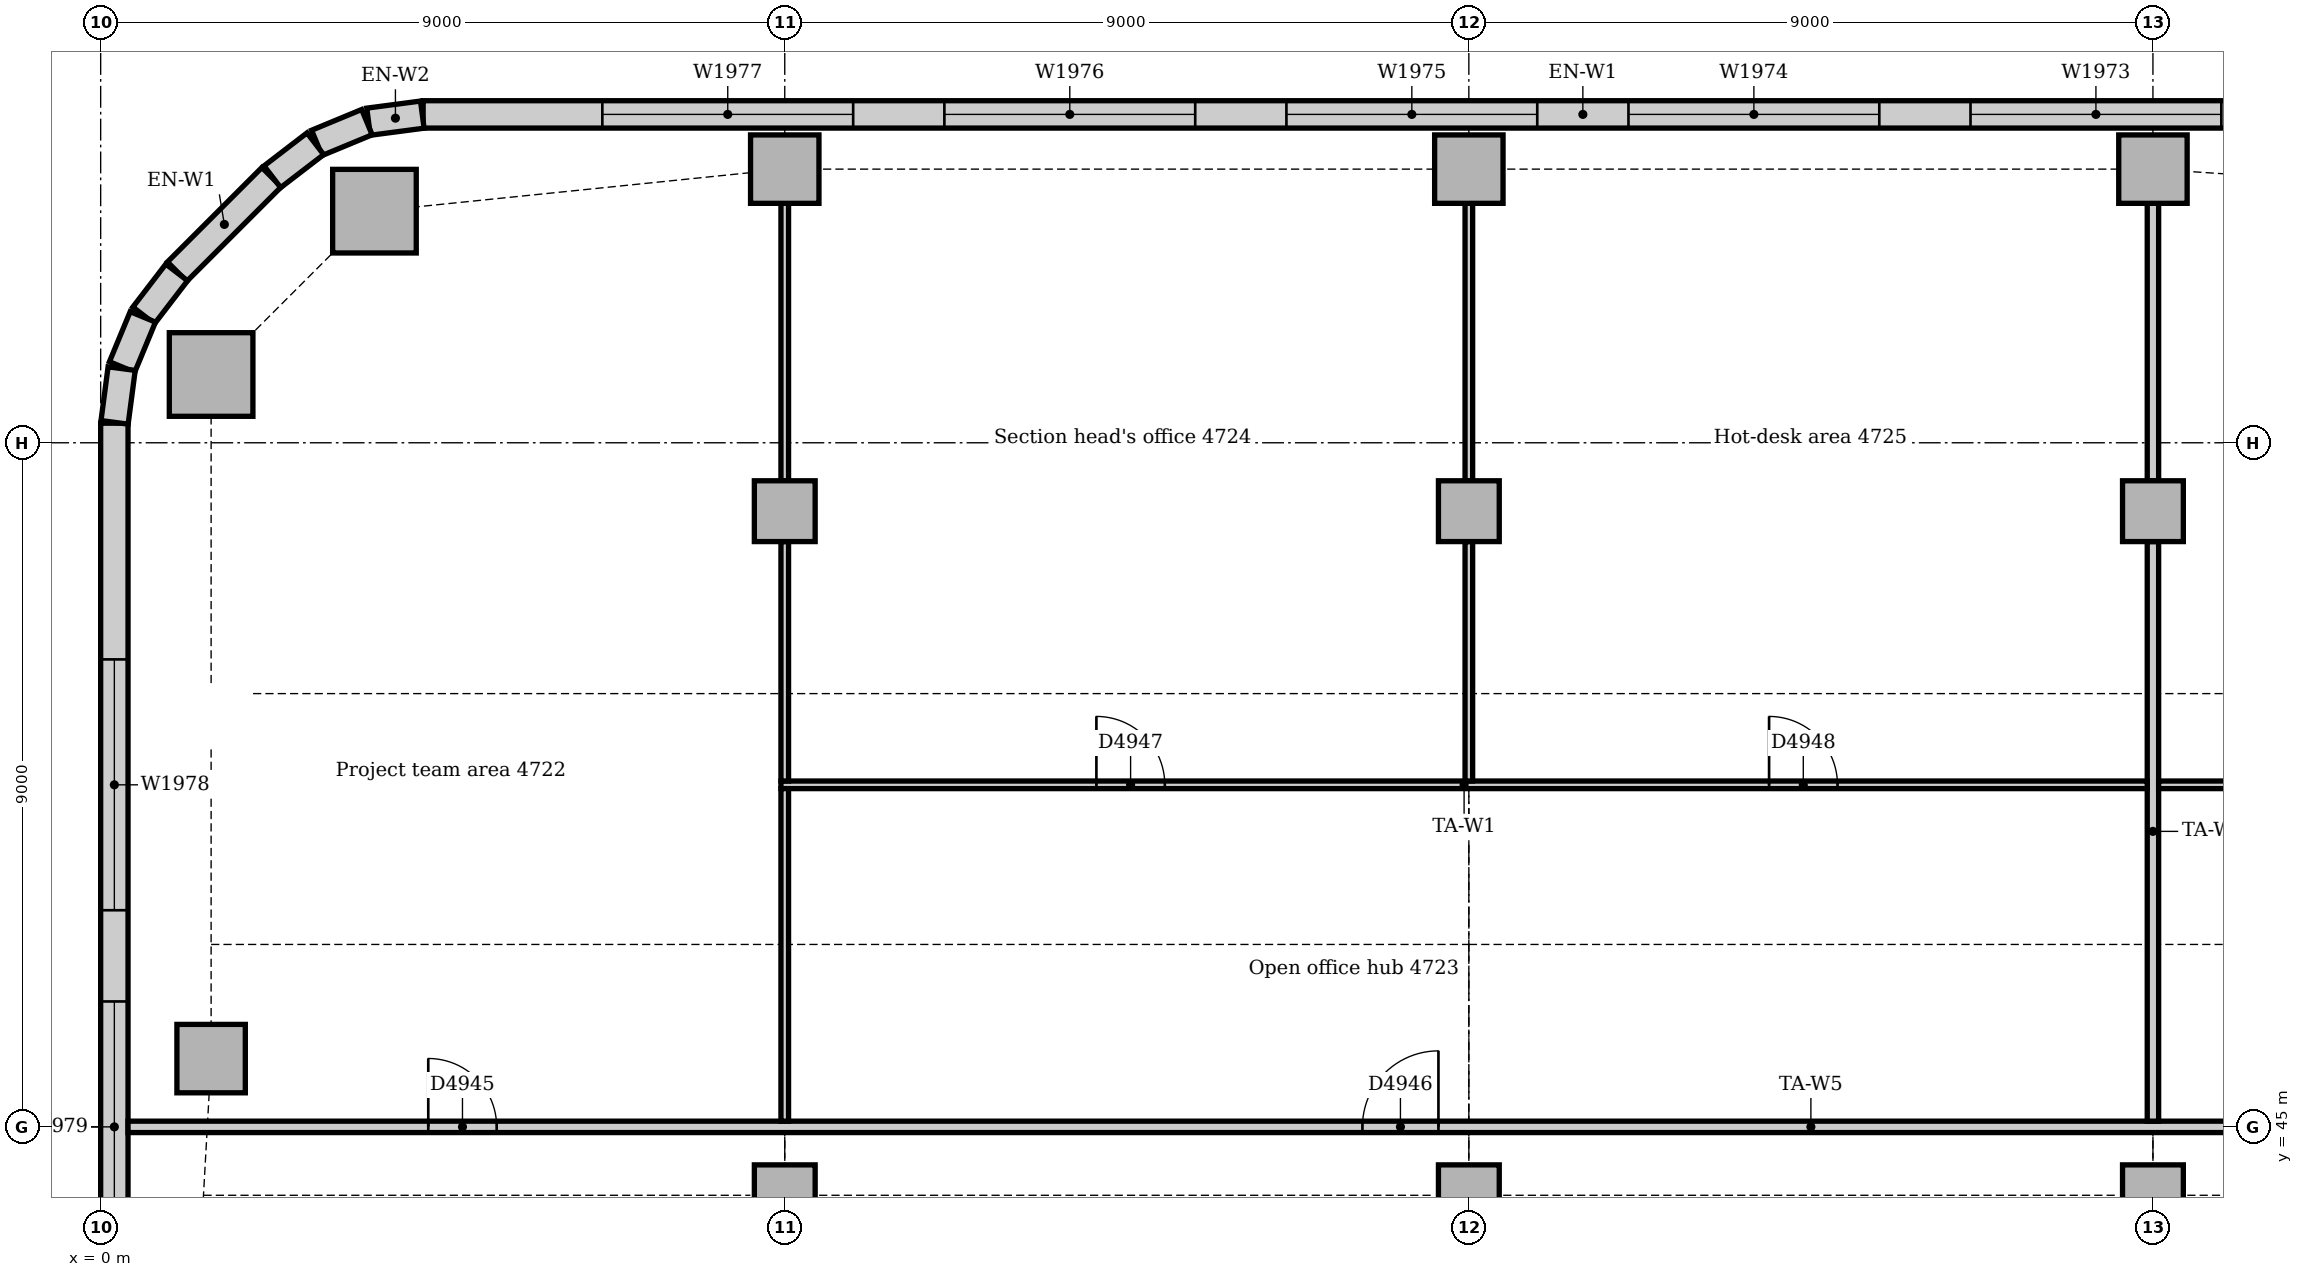
"""IFC4 building model, lengths in metres.
Left out: names, types, materials, properties, quantities, classifications, styles, units other than length and angle.
Written with IfcOpenShell. Run it as: python <this file> out.ifc"""

import sys

from ifc_helpers import new_model, si_unit, direction, frame, frame_2d, origin, origin_2d, place, context, subcontext, project, spatial, rectangle, extrude, element, fill, save


model = new_model("IFC4")
c1 = context("Model", 3, precision=1e-05, world=origin(), true_north=direction((0.0, 1.0)))
c2 = subcontext(c1, "Body", "Model", "MODEL_VIEW")
j1 = project(units=[si_unit("LENGTHUNIT", "METRE"), si_unit("PLANEANGLEUNIT", "RADIAN")], contexts=[c1])
p1 = place(None, origin())
s1 = spatial("IfcSite", under=j1, at=p1, CompositionType="ELEMENT")
p2 = place(p1, origin())
s2 = spatial("IfcBuilding", under=s1, at=p2, CompositionType="ELEMENT")
p3 = place(p2, frame((0.0, 0.0, 198.0)))
s3 = spatial("IfcBuildingStorey", under=s2, at=p3, CompositionType="ELEMENT", Elevation=198.0)
for number, where, z_axis, x_axis in (
    (1, (3.602, 57.047, -0.15), (0.0, 0.0, 1.0), (1.0, 0.0, 0.0)),
    (2, (1.453, 54.898, -0.15), (0.0, 0.0, 1.0), (1.0, 0.0, 0.0)),
):
    element("IfcColumn", number, at=place(p3, frame(where, z_axis=z_axis, x_axis=x_axis)), inside=s3, PredefinedType="COLUMN", context=c2, shape_type="SweptSolid", body=[
        extrude(rectangle(XDim=1.1, YDim=1.1, at=origin_2d()), origin(), (0.0, 0.0, 1.0), 4.0),
    ])
for number, where, z_axis, x_axis in (
    (3, (9.0, 57.6, -0.15), (0.0, 0.0, 1.0), (1.0, 0.0, 0.0)),
    (4, (18.0, 57.6, -0.15), (0.0, 0.0, 1.0), (1.0, 0.0, 0.0)),
    (5, (27.0, 57.6, -0.15), (0.0, 0.0, 1.0), (1.0, 0.0, 0.0)),
):
    element("IfcColumn", number, at=place(p3, frame(where, z_axis=z_axis, x_axis=x_axis)), inside=s3, PredefinedType="COLUMN", context=c2, shape_type="SweptSolid", body=[
        extrude(rectangle(XDim=0.9, YDim=0.9, at=origin_2d()), origin(), (0.0, 0.0, 1.0), 4.0),
    ])
p4 = place(p3, frame((1.453, 45.898, 0.0), z_axis=(0.0, 0.0, 1.0), x_axis=(1.0, 0.0, 0.0)))
e6 = element("IfcColumn", 6, at=p4, inside=s3, PredefinedType="COLUMN", context=c2, shape_type="SweptSolid", body=[
    extrude(rectangle(XDim=0.9, YDim=0.9, at=origin_2d()), origin(), (0.0, 0.0, 1.0), 3.85),
])
for number, where, z_axis, x_axis in (
    (7, (9.0, 44.1, 0.0), (0.0, 0.0, 1.0), (1.0, 0.0, 0.0)),
    (8, (9.0, 53.1, 0.0), (0.0, 0.0, 1.0), (1.0, 0.0, 0.0)),
    (9, (18.0, 44.1, 0.0), (0.0, 0.0, 1.0), (1.0, 0.0, 0.0)),
    (10, (18.0, 53.1, 0.0), (0.0, 0.0, 1.0), (1.0, 0.0, 0.0)),
    (11, (27.0, 44.1, 0.0), (0.0, 0.0, 1.0), (1.0, 0.0, 0.0)),
    (12, (27.0, 53.1, 0.0), (0.0, 0.0, 1.0), (1.0, 0.0, 0.0)),
):
    element("IfcColumn", number, at=place(p3, frame(where, z_axis=z_axis, x_axis=x_axis)), inside=s3, PredefinedType="COLUMN", context=c2, shape_type="SweptSolid", body=[
        extrude(rectangle(XDim=0.8, YDim=0.8, at=origin_2d()), origin(), (0.0, 0.0, 1.0), 3.85),
    ])
p5 = place(p3, frame((34.757, 58.32, 0.0), z_axis=(0.0, 0.0, 1.0), x_axis=(-1.0, 0.0, 0.0)))
e13 = element("IfcWall", 13, at=p5, inside=s3, PredefinedType="STANDARD", context=c2, shape_type="SweptSolid", body=[
    extrude(rectangle(XDim=30.515, YDim=0.36, at=frame_2d((15.257, 0.0))), origin(), (0.0, 0.0, 1.0), 3.85),
])
p6 = place(p5, frame((2.357, 0.0, 0.9)))
e14 = element("IfcOpeningElement", 14, at=p6, cuts=e13, PredefinedType="OPENING", context=c2, shape_type="SweptSolid", body=[
    extrude(rectangle(XDim=3.3, YDim=1.6, at=frame_2d((1.65, 0.8))), frame((0.0, 0.19, 0.0), z_axis=(0.0, -1.0, 0.0), x_axis=(1.0, 0.0, 0.0)), (0.0, 0.0, 1.0), 0.38),
])
p7 = place(p5, frame((6.857, 0.0, 0.9)))
e15 = element("IfcOpeningElement", 15, at=p7, cuts=e13, PredefinedType="OPENING", context=c2, shape_type="SweptSolid", body=[
    extrude(rectangle(XDim=3.3, YDim=1.6, at=frame_2d((1.65, 0.8))), frame((0.0, 0.19, 0.0), z_axis=(0.0, -1.0, 0.0), x_axis=(1.0, 0.0, 0.0)), (0.0, 0.0, 1.0), 0.38),
])
p8 = place(p5, frame((11.357, 0.0, 0.9)))
e16 = element("IfcOpeningElement", 16, at=p8, cuts=e13, PredefinedType="OPENING", context=c2, shape_type="SweptSolid", body=[
    extrude(rectangle(XDim=3.3, YDim=1.6, at=frame_2d((1.65, 0.8))), frame((0.0, 0.19, 0.0), z_axis=(0.0, -1.0, 0.0), x_axis=(1.0, 0.0, 0.0)), (0.0, 0.0, 1.0), 0.38),
])
p9 = place(p5, frame((15.857, 0.0, 0.9)))
e17 = element("IfcOpeningElement", 17, at=p9, cuts=e13, PredefinedType="OPENING", context=c2, shape_type="SweptSolid", body=[
    extrude(rectangle(XDim=3.3, YDim=1.6, at=frame_2d((1.65, 0.8))), frame((0.0, 0.19, 0.0), z_axis=(0.0, -1.0, 0.0), x_axis=(1.0, 0.0, 0.0)), (0.0, 0.0, 1.0), 0.38),
])
p10 = place(p5, frame((20.357, 0.0, 0.9)))
e18 = element("IfcOpeningElement", 18, at=p10, cuts=e13, PredefinedType="OPENING", context=c2, shape_type="SweptSolid", body=[
    extrude(rectangle(XDim=3.3, YDim=1.6, at=frame_2d((1.65, 0.8))), frame((0.0, 0.19, 0.0), z_axis=(0.0, -1.0, 0.0), x_axis=(1.0, 0.0, 0.0)), (0.0, 0.0, 1.0), 0.38),
])
p11 = place(p5, frame((24.857, 0.0, 0.9)))
e19 = element("IfcOpeningElement", 19, at=p11, cuts=e13, PredefinedType="OPENING", context=c2, shape_type="SweptSolid", body=[
    extrude(rectangle(XDim=3.3, YDim=1.6, at=frame_2d((1.65, 0.8))), frame((0.0, 0.19, 0.0), z_axis=(0.0, -1.0, 0.0), x_axis=(1.0, 0.0, 0.0)), (0.0, 0.0, 1.0), 0.38),
])
p12 = place(p3, frame((2.249, 57.494, 0.0), z_axis=(0.0, 0.0, 1.0), x_axis=(-0.707106781187, -0.707106781187, 0.0)))
e20 = element("IfcWall", 20, at=p12, inside=s3, PredefinedType="STANDARD", context=c2, shape_type="SweptSolid", body=[
    extrude(rectangle(XDim=1.757, YDim=0.36, at=frame_2d((0.879, 0.0))), origin(), (0.0, 0.0, 1.0), 3.85),
])
p13 = place(p3, frame((0.18, 54.257, 0.0), z_axis=(0.0, 0.0, 1.0), x_axis=(0.0, -1.0, 0.0)))
e21 = element("IfcWall", 21, at=p13, inside=s3, PredefinedType="STANDARD", context=c2, shape_type="SweptSolid", body=[
    extrude(rectangle(XDim=12.257, YDim=0.36, at=frame_2d((6.129, 0.0))), origin(), (0.0, 0.0, 1.0), 3.85),
])
p14 = place(p13, frame((3.107, 0.0, 0.9)))
e22 = element("IfcOpeningElement", 22, at=p14, cuts=e21, PredefinedType="OPENING", context=c2, shape_type="SweptSolid", body=[
    extrude(rectangle(XDim=3.3, YDim=1.6, at=frame_2d((1.65, 0.8))), frame((0.0, 0.19, 0.0), z_axis=(0.0, -1.0, 0.0), x_axis=(1.0, 0.0, 0.0)), (0.0, 0.0, 1.0), 0.38),
])
p15 = place(p13, frame((7.607, 0.0, 0.9)))
e23 = element("IfcOpeningElement", 23, at=p15, cuts=e21, PredefinedType="OPENING", context=c2, shape_type="SweptSolid", body=[
    extrude(rectangle(XDim=3.3, YDim=1.6, at=frame_2d((1.65, 0.8))), frame((0.0, 0.19, 0.0), z_axis=(0.0, -1.0, 0.0), x_axis=(1.0, 0.0, 0.0)), (0.0, 0.0, 1.0), 0.38),
])
for number, where, z_axis, x_axis in (
    (24, (4.231, 58.317, 0.0), (0.0, 0.0, 1.0), (-0.991, -0.131, 0.0)),
    (25, (3.503, 58.218, 0.0), (0.0, 0.0, 1.0), (-0.924, -0.383, 0.0)),
):
    element("IfcWall", number, at=place(p3, frame(where, z_axis=z_axis, x_axis=x_axis)), inside=s3, PredefinedType="STANDARD", context=c2, shape_type="SweptSolid", body=[
        extrude(rectangle(XDim=0.713, YDim=0.36, at=frame_2d((0.356, 0.0))), origin(), (0.0, 0.0, 1.0), 3.85),
    ])
for number, where, z_axis, x_axis in (
    (26, (2.825, 57.934, 0.0), (0.0, 0.0, 1.0), (-0.793, -0.609, 0.0)),
    (27, (1.0, 56.241, 0.0), (0.0, 0.0, 1.0), (-0.609, -0.793, 0.0)),
):
    element("IfcWall", number, at=place(p3, frame(where, z_axis=z_axis, x_axis=x_axis)), inside=s3, PredefinedType="STANDARD", context=c2, shape_type="SweptSolid", body=[
        extrude(rectangle(XDim=0.713, YDim=0.36, at=frame_2d((0.357, 0.0))), origin(), (0.0, 0.0, 1.0), 3.85),
    ])
for number, where, z_axis, x_axis in (
    (28, (0.555, 55.656, 0.0), (0.0, 0.0, 1.0), (-0.383, -0.924, 0.0)),
    (29, (0.276, 54.976, 0.0), (0.0, 0.0, 1.0), (-0.131, -0.991, 0.0)),
):
    element("IfcWall", number, at=place(p3, frame(where, z_axis=z_axis, x_axis=x_axis)), inside=s3, PredefinedType="STANDARD", context=c2, shape_type="SweptSolid", body=[
        extrude(rectangle(XDim=0.713, YDim=0.36, at=frame_2d((0.356, 0.0))), origin(), (0.0, 0.0, 1.0), 3.85),
    ])
p16 = place(p3, frame((0.36, 45.0, 0.0), z_axis=(0.0, 0.0, 1.0), x_axis=(1.0, 0.0, 0.0)))
e30 = element("IfcWall", 30, at=p16, inside=s3, PredefinedType="PARTITIONING", context=c2, shape_type="SweptSolid", body=[
    extrude(rectangle(XDim=44.28, YDim=0.15, at=frame_2d((22.14, 0.0))), origin(), (0.0, 0.0, 1.0), 3.85),
])
p17 = place(p16, frame((3.95, 0.0, 0.0)))
e31 = element("IfcOpeningElement", 31, at=p17, cuts=e30, PredefinedType="OPENING", context=c2, shape_type="SweptSolid", body=[
    extrude(rectangle(XDim=0.9, YDim=2.1, at=frame_2d((0.45, 1.05))), frame((0.0, 0.085, 0.0), z_axis=(0.0, -1.0, 0.0), x_axis=(1.0, 0.0, 0.0)), (0.0, 0.0, 1.0), 0.17),
])
p18 = place(p16, frame((16.24, 0.0, 0.0)))
e32 = element("IfcOpeningElement", 32, at=p18, cuts=e30, PredefinedType="OPENING", context=c2, shape_type="SweptSolid", body=[
    extrude(rectangle(XDim=1.0, YDim=2.1, at=frame_2d((0.5, 1.05))), frame((0.0, 0.085, 0.0), z_axis=(0.0, -1.0, 0.0), x_axis=(1.0, 0.0, 0.0)), (0.0, 0.0, 1.0), 0.17),
])
p19 = place(p16, frame((34.24, 0.0, 0.0)))
e33 = element("IfcOpeningElement", 33, at=p19, cuts=e30, PredefinedType="OPENING", context=c2, shape_type="SweptSolid", body=[
    extrude(rectangle(XDim=1.0, YDim=2.1, at=frame_2d((0.5, 1.05))), frame((0.0, 0.085, 0.0), z_axis=(0.0, -1.0, 0.0), x_axis=(1.0, 0.0, 0.0)), (0.0, 0.0, 1.0), 0.17),
])
p20 = place(p3, frame((27.0, 45.075, 0.0), z_axis=(0.0, 0.0, 1.0), x_axis=(0.0, 1.0, 0.0)))
e34 = element("IfcWall", 34, at=p20, inside=s3, PredefinedType="PARTITIONING", context=c2, shape_type="SweptSolid", body=[
    extrude(rectangle(XDim=7.625, YDim=0.15, at=frame_2d((3.812, 0.0))), origin(), (0.0, 0.0, 1.0), 3.35),
])
p21 = place(p3, frame((27.0, 53.5, 0.0), z_axis=(0.0, 0.0, 1.0), x_axis=(0.0, 1.0, 0.0)))
e35 = element("IfcWall", 35, at=p21, inside=s3, PredefinedType="PARTITIONING", context=c2, shape_type="SweptSolid", body=[
    extrude(rectangle(XDim=3.65, YDim=0.15, at=frame_2d((1.825, 0.0))), origin(), (0.0, 0.0, 1.0), 3.41),
])
p22 = place(p3, frame((8.95, 49.5, 0.0), z_axis=(0.0, 0.0, 1.0), x_axis=(1.0, 0.0, 0.0)))
e36 = element("IfcWall", 36, at=p22, inside=s3, PredefinedType="PARTITIONING", context=c2, shape_type="SweptSolid", body=[
    extrude(rectangle(XDim=17.975, YDim=0.1, at=frame_2d((8.988, 0.0))), origin(), (0.0, 0.0, 1.0), 3.85),
])
p23 = place(p22, frame((4.15, 0.0, 0.0)))
e37 = element("IfcOpeningElement", 37, at=p23, cuts=e36, PredefinedType="OPENING", context=c2, shape_type="SweptSolid", body=[
    extrude(rectangle(XDim=0.9, YDim=2.1, at=frame_2d((0.45, 1.05))), frame((0.0, 0.06, 0.0), z_axis=(0.0, -1.0, 0.0), x_axis=(1.0, 0.0, 0.0)), (0.0, 0.0, 1.0), 0.12),
])
p24 = place(p22, frame((13.0, 0.0, 0.0)))
e38 = element("IfcOpeningElement", 38, at=p24, cuts=e36, PredefinedType="OPENING", context=c2, shape_type="SweptSolid", body=[
    extrude(rectangle(XDim=0.9, YDim=2.1, at=frame_2d((0.45, 1.05))), frame((0.0, 0.06, 0.0), z_axis=(0.0, -1.0, 0.0), x_axis=(1.0, 0.0, 0.0)), (0.0, 0.0, 1.0), 0.12),
])
p25 = place(p3, frame((27.075, 49.5, 0.0), z_axis=(0.0, 0.0, 1.0), x_axis=(1.0, 0.0, 0.0)))
e39 = element("IfcWall", 39, at=p25, inside=s3, PredefinedType="PARTITIONING", context=c2, shape_type="SweptSolid", body=[
    extrude(rectangle(XDim=17.24, YDim=0.1, at=frame_2d((8.62, 0.0))), origin(), (0.0, 0.0, 1.0), 3.85),
])
p26 = place(p25, frame((4.1, 0.0, 0.0)))
e40 = element("IfcOpeningElement", 40, at=p26, cuts=e39, PredefinedType="OPENING", context=c2, shape_type="SweptSolid", body=[
    extrude(rectangle(XDim=0.9, YDim=2.1, at=frame_2d((0.45, 1.05))), frame((0.0, 0.06, 0.0), z_axis=(0.0, -1.0, 0.0), x_axis=(1.0, 0.0, 0.0)), (0.0, 0.0, 1.0), 0.12),
])
p27 = place(p25, frame((12.575, 0.0, 0.0)))
e41 = element("IfcOpeningElement", 41, at=p27, cuts=e39, PredefinedType="OPENING", context=c2, shape_type="SweptSolid", body=[
    extrude(rectangle(XDim=0.9, YDim=2.1, at=frame_2d((0.45, 1.05))), frame((0.0, 0.06, 0.0), z_axis=(0.0, -1.0, 0.0), x_axis=(1.0, 0.0, 0.0)), (0.0, 0.0, 1.0), 0.12),
])
p28 = place(p3, frame((9.0, 45.075, 0.0), z_axis=(0.0, 0.0, 1.0), x_axis=(0.0, 1.0, 0.0)))
e42 = element("IfcWall", 42, at=p28, inside=s3, PredefinedType="PARTITIONING", context=c2, shape_type="SweptSolid", body=[
    extrude(rectangle(XDim=4.375, YDim=0.1, at=frame_2d((2.188, 0.0))), origin(), (0.0, 0.0, 1.0), 3.35),
])
p29 = place(p3, frame((9.0, 49.55, 0.0), z_axis=(0.0, 0.0, 1.0), x_axis=(0.0, 1.0, 0.0)))
e43 = element("IfcWall", 43, at=p29, inside=s3, PredefinedType="PARTITIONING", context=c2, shape_type="SweptSolid", body=[
    extrude(rectangle(XDim=3.15, YDim=0.1, at=frame_2d((1.575, 0.0))), origin(), (0.0, 0.0, 1.0), 3.35),
])
p30 = place(p3, frame((9.0, 53.5, 0.0), z_axis=(0.0, 0.0, 1.0), x_axis=(0.0, 1.0, 0.0)))
e44 = element("IfcWall", 44, at=p30, inside=s3, PredefinedType="PARTITIONING", context=c2, shape_type="SweptSolid", body=[
    extrude(rectangle(XDim=3.65, YDim=0.1, at=frame_2d((1.825, 0.0))), origin(), (0.0, 0.0, 1.0), 3.41),
])
p31 = place(p3, frame((18.0, 49.55, 0.0), z_axis=(0.0, 0.0, 1.0), x_axis=(0.0, 1.0, 0.0)))
e45 = element("IfcWall", 45, at=p31, inside=s3, PredefinedType="PARTITIONING", context=c2, shape_type="SweptSolid", body=[
    extrude(rectangle(XDim=3.15, YDim=0.1, at=frame_2d((1.575, 0.0))), origin(), (0.0, 0.0, 1.0), 3.35),
])
p32 = place(p3, frame((18.0, 53.5, 0.0), z_axis=(0.0, 0.0, 1.0), x_axis=(0.0, 1.0, 0.0)))
e46 = element("IfcWall", 46, at=p32, inside=s3, PredefinedType="PARTITIONING", context=c2, shape_type="SweptSolid", body=[
    extrude(rectangle(XDim=3.65, YDim=0.1, at=frame_2d((1.825, 0.0))), origin(), (0.0, 0.0, 1.0), 3.41),
])
p33 = place(p7, origin())
e47 = element("IfcWindow", 47, at=p33, inside=s3, PartitioningType="SINGLE_PANEL", PredefinedType="WINDOW", context=c2, shape_type="SweptSolid", body=[
    extrude(rectangle(XDim=3.3, YDim=1.6, at=frame_2d((1.65, 0.8))), frame((0.0, 0.13, 0.0), z_axis=(0.0, -1.0, 0.0), x_axis=(1.0, 0.0, 0.0)), (0.0, 0.0, 1.0), 0.06),
])
fill(e15, e47)
p34 = place(p8, origin())
e48 = element("IfcWindow", 48, at=p34, inside=s3, PartitioningType="SINGLE_PANEL", PredefinedType="WINDOW", context=c2, shape_type="SweptSolid", body=[
    extrude(rectangle(XDim=3.3, YDim=1.6, at=frame_2d((1.65, 0.8))), frame((0.0, 0.13, 0.0), z_axis=(0.0, -1.0, 0.0), x_axis=(1.0, 0.0, 0.0)), (0.0, 0.0, 1.0), 0.06),
])
fill(e16, e48)
p35 = place(p9, origin())
e49 = element("IfcWindow", 49, at=p35, inside=s3, PartitioningType="SINGLE_PANEL", PredefinedType="WINDOW", context=c2, shape_type="SweptSolid", body=[
    extrude(rectangle(XDim=3.3, YDim=1.6, at=frame_2d((1.65, 0.8))), frame((0.0, 0.13, 0.0), z_axis=(0.0, -1.0, 0.0), x_axis=(1.0, 0.0, 0.0)), (0.0, 0.0, 1.0), 0.06),
])
fill(e17, e49)
p36 = place(p10, origin())
e50 = element("IfcWindow", 50, at=p36, inside=s3, PartitioningType="SINGLE_PANEL", PredefinedType="WINDOW", context=c2, shape_type="SweptSolid", body=[
    extrude(rectangle(XDim=3.3, YDim=1.6, at=frame_2d((1.65, 0.8))), frame((0.0, 0.13, 0.0), z_axis=(0.0, -1.0, 0.0), x_axis=(1.0, 0.0, 0.0)), (0.0, 0.0, 1.0), 0.06),
])
fill(e18, e50)
p37 = place(p11, origin())
e51 = element("IfcWindow", 51, at=p37, inside=s3, PartitioningType="SINGLE_PANEL", PredefinedType="WINDOW", context=c2, shape_type="SweptSolid", body=[
    extrude(rectangle(XDim=3.3, YDim=1.6, at=frame_2d((1.65, 0.8))), frame((0.0, 0.13, 0.0), z_axis=(0.0, -1.0, 0.0), x_axis=(1.0, 0.0, 0.0)), (0.0, 0.0, 1.0), 0.06),
])
fill(e19, e51)
p38 = place(p14, origin())
e52 = element("IfcWindow", 52, at=p38, inside=s3, PartitioningType="SINGLE_PANEL", PredefinedType="WINDOW", context=c2, shape_type="SweptSolid", body=[
    extrude(rectangle(XDim=3.3, YDim=1.6, at=frame_2d((1.65, 0.8))), frame((0.0, 0.13, 0.0), z_axis=(0.0, -1.0, 0.0), x_axis=(1.0, 0.0, 0.0)), (0.0, 0.0, 1.0), 0.06),
])
fill(e22, e52)
p39 = place(p15, origin())
e53 = element("IfcWindow", 53, at=p39, inside=s3, PartitioningType="SINGLE_PANEL", PredefinedType="WINDOW", context=c2, shape_type="SweptSolid", body=[
    extrude(rectangle(XDim=3.3, YDim=1.6, at=frame_2d((1.65, 0.8))), frame((0.0, 0.13, 0.0), z_axis=(0.0, -1.0, 0.0), x_axis=(1.0, 0.0, 0.0)), (0.0, 0.0, 1.0), 0.06),
])
fill(e23, e53)
p40 = place(p17, origin())
e54 = element("IfcDoor", 54, at=p40, inside=s3, OperationType="SINGLE_SWING_LEFT", PredefinedType="DOOR", context=c2, shape_type="SweptSolid", body=[
    extrude(rectangle(XDim=0.9, YDim=2.1, at=frame_2d((0.45, 1.05))), frame((0.0, 0.025, 0.0), z_axis=(0.0, -1.0, 0.0), x_axis=(1.0, 0.0, 0.0)), (0.0, 0.0, 1.0), 0.05),
])
fill(e31, e54)
p41 = place(p18, origin())
e55 = element("IfcDoor", 55, at=p41, inside=s3, OperationType="SINGLE_SWING_RIGHT", PredefinedType="DOOR", context=c2, shape_type="SweptSolid", body=[
    extrude(rectangle(XDim=1.0, YDim=2.1, at=frame_2d((0.5, 1.05))), frame((0.0, 0.025, 0.0), z_axis=(0.0, -1.0, 0.0), x_axis=(1.0, 0.0, 0.0)), (0.0, 0.0, 1.0), 0.05),
])
fill(e32, e55)
p42 = place(p23, origin())
e56 = element("IfcDoor", 56, at=p42, inside=s3, OperationType="SINGLE_SWING_LEFT", PredefinedType="DOOR", context=c2, shape_type="SweptSolid", body=[
    extrude(rectangle(XDim=0.9, YDim=2.1, at=frame_2d((0.45, 1.05))), frame((0.0, 0.025, 0.0), z_axis=(0.0, -1.0, 0.0), x_axis=(1.0, 0.0, 0.0)), (0.0, 0.0, 1.0), 0.05),
])
fill(e37, e56)
p43 = place(p24, origin())
e57 = element("IfcDoor", 57, at=p43, inside=s3, OperationType="SINGLE_SWING_LEFT", PredefinedType="DOOR", context=c2, shape_type="SweptSolid", body=[
    extrude(rectangle(XDim=0.9, YDim=2.1, at=frame_2d((0.45, 1.05))), frame((0.0, 0.025, 0.0), z_axis=(0.0, -1.0, 0.0), x_axis=(1.0, 0.0, 0.0)), (0.0, 0.0, 1.0), 0.05),
])
fill(e38, e57)
save(model, sys.argv[1])
